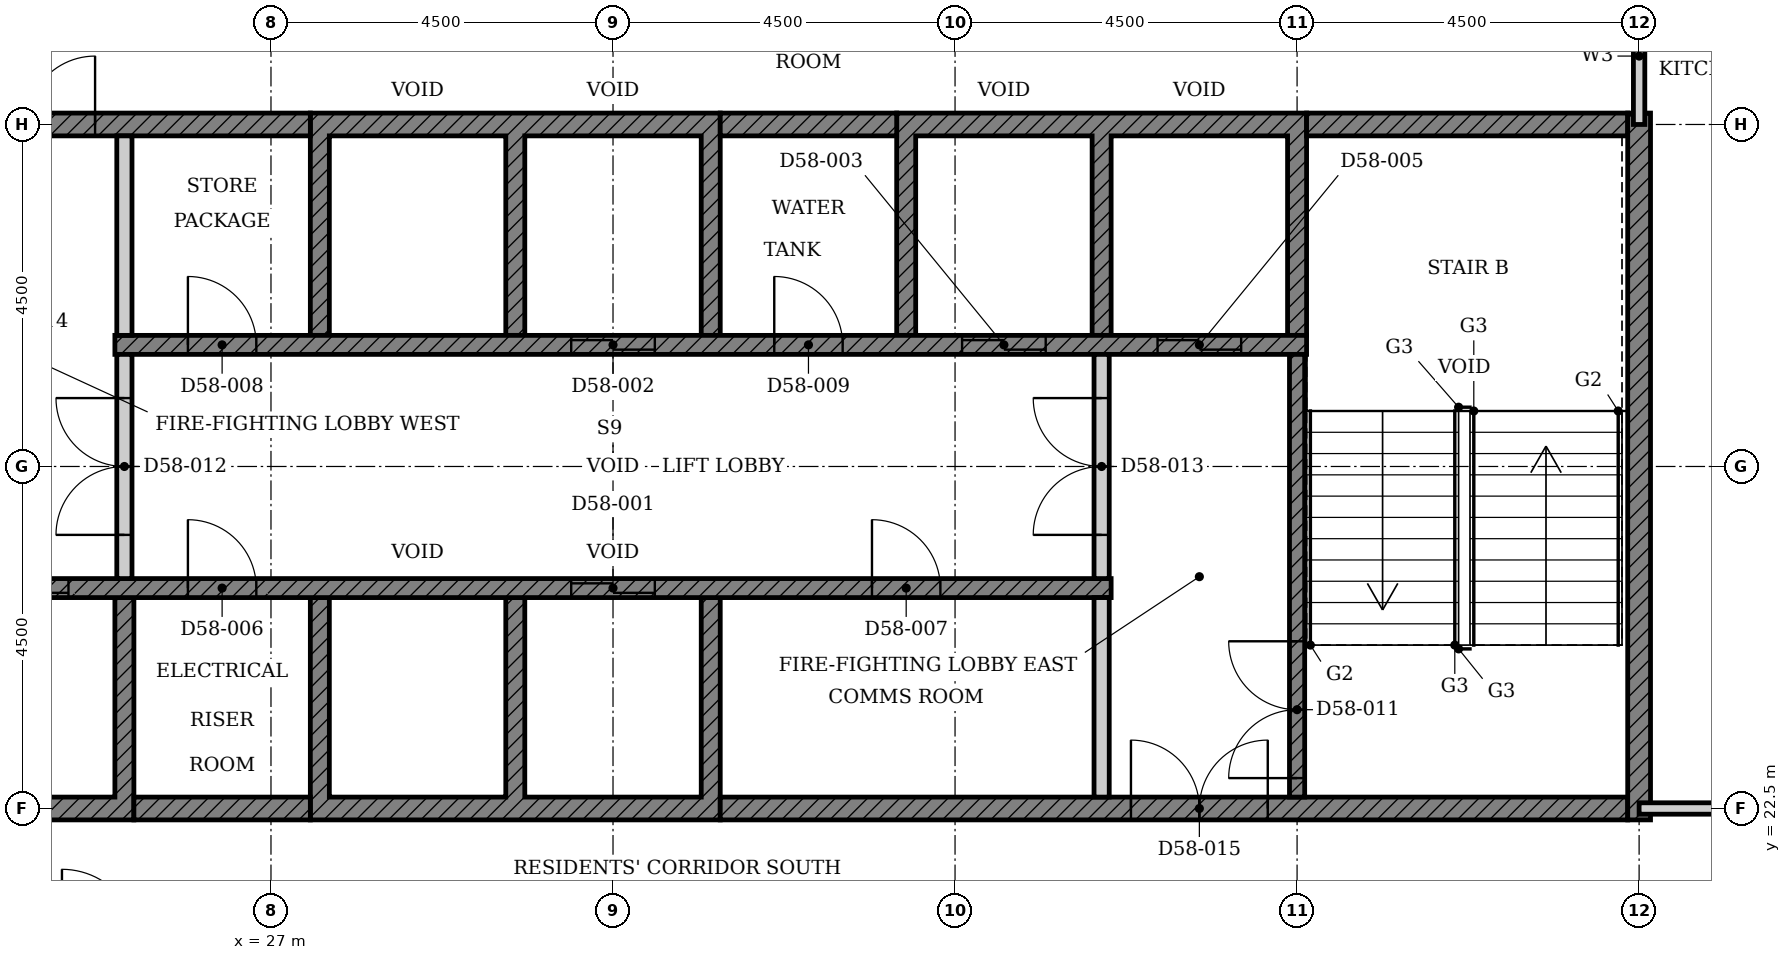
"""IFC4 building model, lengths in metres.
Left out: names, types, materials, properties, quantities, classifications, styles, units other than length and angle.
Written with IfcOpenShell. Run it as: python <this file> out.ifc"""

import sys

from ifc_helpers import new_model, si_unit, direction, frame, frame_2d, origin, place, context, subcontext, project, spatial, polyline, rectangle, outline, extrude, element, fill, save


model = new_model("IFC4")
c1 = context("Model", 3, precision=1e-05, world=origin(), true_north=direction((0.0, 1.0)))
c2 = subcontext(c1, "Body", "Model", "MODEL_VIEW")
j1 = project(units=[si_unit("LENGTHUNIT", "METRE"), si_unit("PLANEANGLEUNIT", "RADIAN")], contexts=[c1])
p1 = place(None, origin())
s1 = spatial("IfcSite", under=j1, at=p1, CompositionType="ELEMENT")
p2 = place(p1, origin())
s2 = spatial("IfcBuilding", under=s1, at=p2, CompositionType="ELEMENT")
p3 = place(p2, frame((0.0, 0.0, 229.4)))
s3 = spatial("IfcBuildingStorey", under=s2, at=p3, CompositionType="ELEMENT", Elevation=229.4)
p4 = place(p3, origin())
e1 = element("IfcWall", 1, at=p4, inside=s3, PredefinedType="SHEAR", context=c2, shape_type="SweptSolid", body=[
    extrude(outline(polyline([(22.375, 22.35), (25.197, 22.35), (25.197, 25.275), (24.947, 25.275), (24.947, 22.65), (22.625, 22.65), (22.625, 25.275), (22.375, 25.275), (22.375, 22.35)])), origin(), (0.0, 0.0, 1.0), 3.3),
])
p5 = place(p3, origin())
e2 = element("IfcWall", 2, at=p5, inside=s3, PredefinedType="SHEAR", context=c2, shape_type="SweptSolid", body=[
    extrude(outline(polyline([(27.518, 22.35), (32.911, 22.35), (32.911, 25.275), (32.661, 25.275), (32.661, 22.65), (30.339, 22.65), (30.339, 25.275), (30.089, 25.275), (30.089, 22.65), (27.768, 22.65), (27.768, 25.275), (27.518, 25.275), (27.518, 22.35)])), origin(), (0.0, 0.0, 1.0), 3.3),
])
p6 = place(p3, origin())
e3 = element("IfcWall", 3, at=p6, inside=s3, PredefinedType="SHEAR", context=c2, shape_type="SweptSolid", body=[
    extrude(outline(polyline([(27.518, 28.725), (27.768, 28.725), (27.768, 31.35), (30.089, 31.35), (30.089, 28.725), (30.339, 28.725), (30.339, 31.35), (32.661, 31.35), (32.661, 28.725), (32.911, 28.725), (32.911, 31.65), (27.518, 31.65), (27.518, 28.725)])), origin(), (0.0, 0.0, 1.0), 3.3),
])
p7 = place(p3, origin())
e4 = element("IfcWall", 4, at=p7, inside=s3, PredefinedType="SHEAR", context=c2, shape_type="SweptSolid", body=[
    extrude(outline(polyline([(35.232, 28.725), (35.482, 28.725), (35.482, 31.35), (37.803, 31.35), (37.803, 28.725), (38.053, 28.725), (38.053, 31.35), (40.375, 31.35), (40.375, 28.725), (40.625, 28.725), (40.625, 31.65), (35.232, 31.65), (35.232, 28.725)])), origin(), (0.0, 0.0, 1.0), 3.3),
])
p8 = place(p3, frame((25.197, 22.5, 0.0), z_axis=(0.0, 0.0, 1.0), x_axis=(1.0, 0.0, 0.0)))
e5 = element("IfcWall", 5, at=p8, inside=s3, PredefinedType="SHEAR", context=c2, shape_type="SweptSolid", body=[
    extrude(rectangle(XDim=2.321, YDim=0.3, at=frame_2d((1.161, 0.0))), origin(), (0.0, 0.0, 1.0), 3.3),
])
p9 = place(p3, frame((32.911, 22.5, 0.0), z_axis=(0.0, 0.0, 1.0), x_axis=(1.0, 0.0, 0.0)))
e6 = element("IfcWall", 6, at=p9, inside=s3, PredefinedType="SHEAR", context=c2, shape_type="SweptSolid", body=[
    extrude(rectangle(XDim=11.939, YDim=0.3, at=frame_2d((5.97, 0.0))), origin(), (0.0, 0.0, 1.0), 3.3),
])
p10 = place(p9, frame((5.404, 0.0, 0.0)))
e7 = element("IfcOpeningElement", 7, at=p10, cuts=e6, PredefinedType="OPENING", context=c2, shape_type="SweptSolid", body=[
    extrude(rectangle(XDim=1.8, YDim=2.1, at=frame_2d((0.9, 1.05))), frame((0.0, 0.16, 0.0), z_axis=(0.0, -1.0, 0.0), x_axis=(1.0, 0.0, 0.0)), (0.0, 0.0, 1.0), 0.32),
])
p11 = place(p3, frame((18.15, 31.5, 0.0), z_axis=(0.0, 0.0, 1.0), x_axis=(1.0, 0.0, 0.0)))
e8 = element("IfcWall", 8, at=p11, inside=s3, PredefinedType="SHEAR", context=c2, shape_type="SweptSolid", body=[
    extrude(rectangle(XDim=9.368, YDim=0.3, at=frame_2d((4.684, 0.0))), origin(), (0.0, 0.0, 1.0), 3.3),
])
p12 = place(p11, frame((4.736, 0.0, 0.0)))
e9 = element("IfcOpeningElement", 9, at=p12, cuts=e8, PredefinedType="OPENING", context=c2, shape_type="SweptSolid", body=[
    extrude(rectangle(XDim=1.8, YDim=2.1, at=frame_2d((0.9, 1.05))), frame((0.0, 0.16, 0.0), z_axis=(0.0, -1.0, 0.0), x_axis=(1.0, 0.0, 0.0)), (0.0, 0.0, 1.0), 0.32),
])
p13 = place(p3, frame((32.911, 31.5, 0.0), z_axis=(0.0, 0.0, 1.0), x_axis=(1.0, 0.0, 0.0)))
e10 = element("IfcWall", 10, at=p13, inside=s3, PredefinedType="SHEAR", context=c2, shape_type="SweptSolid", body=[
    extrude(rectangle(XDim=2.322, YDim=0.3, at=frame_2d((1.161, 0.0))), origin(), (0.0, 0.0, 1.0), 3.3),
])
p14 = place(p3, frame((40.625, 31.5, 0.0), z_axis=(0.0, 0.0, 1.0), x_axis=(1.0, 0.0, 0.0)))
e11 = element("IfcWall", 11, at=p14, inside=s3, PredefinedType="SHEAR", context=c2, shape_type="SweptSolid", body=[
    extrude(rectangle(XDim=4.225, YDim=0.3, at=frame_2d((2.113, 0.0))), origin(), (0.0, 0.0, 1.0), 3.3),
])
p15 = place(p3, frame((45.0, 22.35, 0.0), z_axis=(0.0, 0.0, 1.0), x_axis=(0.0, 1.0, 0.0)))
e12 = element("IfcWall", 12, at=p15, inside=s3, PredefinedType="SHEAR", context=c2, shape_type="SweptSolid", body=[
    extrude(rectangle(XDim=9.3, YDim=0.3, at=frame_2d((4.65, 0.0))), origin(), (0.0, 0.0, 1.0), 3.3),
])
p16 = place(p3, frame((22.375, 25.4, 0.0), z_axis=(0.0, 0.0, 1.0), x_axis=(1.0, 0.0, 0.0)))
e13 = element("IfcWall", 13, at=p16, inside=s3, PredefinedType="SHEAR", context=c2, shape_type="SweptSolid", body=[
    extrude(rectangle(XDim=15.678, YDim=0.25, at=frame_2d((7.839, 0.0))), origin(), (0.0, 0.0, 1.0), 3.3),
])
p17 = place(p16, frame((8.575, 0.0, 0.0)))
e14 = element("IfcOpeningElement", 14, at=p17, cuts=e13, PredefinedType="OPENING", context=c2, shape_type="SweptSolid", body=[
    extrude(rectangle(XDim=1.1, YDim=2.1, at=frame_2d((0.55, 1.05))), frame((0.0, 0.135, 0.0), z_axis=(0.0, -1.0, 0.0), x_axis=(1.0, 0.0, 0.0)), (0.0, 0.0, 1.0), 0.27),
])
p18 = place(p16, frame((0.861, 0.0, 0.0)))
e15 = element("IfcOpeningElement", 15, at=p18, cuts=e13, PredefinedType="OPENING", context=c2, shape_type="SweptSolid", body=[
    extrude(rectangle(XDim=1.1, YDim=2.1, at=frame_2d((0.55, 1.05))), frame((0.0, 0.135, 0.0), z_axis=(0.0, -1.0, 0.0), x_axis=(1.0, 0.0, 0.0)), (0.0, 0.0, 1.0), 0.27),
])
p19 = place(p16, frame((3.532, 0.0, 0.0)))
e16 = element("IfcOpeningElement", 16, at=p19, cuts=e13, PredefinedType="OPENING", context=c2, shape_type="SweptSolid", body=[
    extrude(rectangle(XDim=0.9, YDim=2.1, at=frame_2d((0.45, 1.05))), frame((0.0, 0.135, 0.0), z_axis=(0.0, -1.0, 0.0), x_axis=(1.0, 0.0, 0.0)), (0.0, 0.0, 1.0), 0.27),
])
p20 = place(p16, frame((12.532, 0.0, 0.0)))
e17 = element("IfcOpeningElement", 17, at=p20, cuts=e13, PredefinedType="OPENING", context=c2, shape_type="SweptSolid", body=[
    extrude(rectangle(XDim=0.9, YDim=2.1, at=frame_2d((0.45, 1.05))), frame((0.0, 0.135, 0.0), z_axis=(0.0, -1.0, 0.0), x_axis=(1.0, 0.0, 0.0)), (0.0, 0.0, 1.0), 0.27),
])
p21 = place(p3, frame((24.947, 28.6, 0.0), z_axis=(0.0, 0.0, 1.0), x_axis=(1.0, 0.0, 0.0)))
e18 = element("IfcWall", 18, at=p21, inside=s3, PredefinedType="SHEAR", context=c2, shape_type="SweptSolid", body=[
    extrude(rectangle(XDim=15.678, YDim=0.25, at=frame_2d((7.839, 0.0))), origin(), (0.0, 0.0, 1.0), 3.3),
])
p22 = place(p21, frame((6.004, 0.0, 0.0)))
e19 = element("IfcOpeningElement", 19, at=p22, cuts=e18, PredefinedType="OPENING", context=c2, shape_type="SweptSolid", body=[
    extrude(rectangle(XDim=1.1, YDim=2.1, at=frame_2d((0.55, 1.05))), frame((0.0, 0.135, 0.0), z_axis=(0.0, -1.0, 0.0), x_axis=(1.0, 0.0, 0.0)), (0.0, 0.0, 1.0), 0.27),
])
p23 = place(p21, frame((11.146, 0.0, 0.0)))
e20 = element("IfcOpeningElement", 20, at=p23, cuts=e18, PredefinedType="OPENING", context=c2, shape_type="SweptSolid", body=[
    extrude(rectangle(XDim=1.1, YDim=2.1, at=frame_2d((0.55, 1.05))), frame((0.0, 0.135, 0.0), z_axis=(0.0, -1.0, 0.0), x_axis=(1.0, 0.0, 0.0)), (0.0, 0.0, 1.0), 0.27),
])
p24 = place(p21, frame((13.718, 0.0, 0.0)))
e21 = element("IfcOpeningElement", 21, at=p24, cuts=e18, PredefinedType="OPENING", context=c2, shape_type="SweptSolid", body=[
    extrude(rectangle(XDim=1.1, YDim=2.1, at=frame_2d((0.55, 1.05))), frame((0.0, 0.135, 0.0), z_axis=(0.0, -1.0, 0.0), x_axis=(1.0, 0.0, 0.0)), (0.0, 0.0, 1.0), 0.27),
])
p25 = place(p21, frame((0.961, 0.0, 0.0)))
e22 = element("IfcOpeningElement", 22, at=p25, cuts=e18, PredefinedType="OPENING", context=c2, shape_type="SweptSolid", body=[
    extrude(rectangle(XDim=0.9, YDim=2.1, at=frame_2d((0.45, 1.05))), frame((0.0, 0.135, 0.0), z_axis=(0.0, -1.0, 0.0), x_axis=(1.0, 0.0, 0.0)), (0.0, 0.0, 1.0), 0.27),
])
p26 = place(p21, frame((8.675, 0.0, 0.0)))
e23 = element("IfcOpeningElement", 23, at=p26, cuts=e18, PredefinedType="OPENING", context=c2, shape_type="SweptSolid", body=[
    extrude(rectangle(XDim=0.9, YDim=2.1, at=frame_2d((0.45, 1.05))), frame((0.0, 0.135, 0.0), z_axis=(0.0, -1.0, 0.0), x_axis=(1.0, 0.0, 0.0)), (0.0, 0.0, 1.0), 0.27),
])
for number, where, z_axis, x_axis in (
    (24, (37.928, 22.65, 0.0), (0.0, 0.0, 1.0), (0.0, 1.0, 0.0)),
    (25, (25.072, 28.725, 0.0), (0.0, 0.0, 1.0), (0.0, 1.0, 0.0)),
):
    element("IfcWall", number, at=place(p3, frame(where, z_axis=z_axis, x_axis=x_axis)), inside=s3, PredefinedType="PARTITIONING", context=c2, shape_type="SweptSolid", body=[
        extrude(rectangle(XDim=2.625, YDim=0.2, at=frame_2d((1.312, 0.0))), origin(), (0.0, 0.0, 1.0), 3.3),
    ])
p27 = place(p3, frame((40.5, 22.65, 0.0), z_axis=(0.0, 0.0, 1.0), x_axis=(0.0, 1.0, 0.0)))
e26 = element("IfcWall", 26, at=p27, inside=s3, PredefinedType="SHEAR", context=c2, shape_type="SweptSolid", body=[
    extrude(rectangle(XDim=5.825, YDim=0.2, at=frame_2d((2.913, 0.0))), origin(), (0.0, 0.0, 1.0), 3.3),
])
p28 = place(p27, frame((0.25, 0.0, 0.0)))
e27 = element("IfcOpeningElement", 27, at=p28, cuts=e26, PredefinedType="OPENING", context=c2, shape_type="SweptSolid", body=[
    extrude(rectangle(XDim=1.8, YDim=2.1, at=frame_2d((0.9, 1.05))), frame((0.0, 0.11, 0.0), z_axis=(0.0, -1.0, 0.0), x_axis=(1.0, 0.0, 0.0)), (0.0, 0.0, 1.0), 0.22),
])
p29 = place(p3, frame((25.072, 25.525, 0.0), z_axis=(0.0, 0.0, 1.0), x_axis=(0.0, 1.0, 0.0)))
e28 = element("IfcWall", 28, at=p29, inside=s3, PredefinedType="PARTITIONING", context=c2, shape_type="SweptSolid", body=[
    extrude(rectangle(XDim=2.95, YDim=0.2, at=frame_2d((1.475, 0.0))), origin(), (0.0, 0.0, 1.0), 3.3),
])
p30 = place(p29, frame((0.575, 0.0, 0.0)))
e29 = element("IfcOpeningElement", 29, at=p30, cuts=e28, PredefinedType="OPENING", context=c2, shape_type="SweptSolid", body=[
    extrude(rectangle(XDim=1.8, YDim=2.1, at=frame_2d((0.9, 1.05))), frame((0.0, 0.11, 0.0), z_axis=(0.0, -1.0, 0.0), x_axis=(1.0, 0.0, 0.0)), (0.0, 0.0, 1.0), 0.22),
])
p31 = place(p3, frame((37.928, 25.525, 0.0), z_axis=(0.0, 0.0, 1.0), x_axis=(0.0, 1.0, 0.0)))
e30 = element("IfcWall", 30, at=p31, inside=s3, PredefinedType="PARTITIONING", context=c2, shape_type="SweptSolid", body=[
    extrude(rectangle(XDim=2.95, YDim=0.2, at=frame_2d((1.475, 0.0))), origin(), (0.0, 0.0, 1.0), 3.3),
])
p32 = place(p31, frame((0.575, 0.0, 0.0)))
e31 = element("IfcOpeningElement", 31, at=p32, cuts=e30, PredefinedType="OPENING", context=c2, shape_type="SweptSolid", body=[
    extrude(rectangle(XDim=1.8, YDim=2.1, at=frame_2d((0.9, 1.05))), frame((0.0, 0.11, 0.0), z_axis=(0.0, -1.0, 0.0), x_axis=(1.0, 0.0, 0.0)), (0.0, 0.0, 1.0), 0.22),
])
p33 = place(p3, frame((45.0, 22.5, 0.0), z_axis=(0.0, 0.0, 1.0), x_axis=(1.0, 0.0, 0.0)))
e32 = element("IfcWall", 32, at=p33, inside=s3, PredefinedType="PARTITIONING", context=c2, shape_type="SweptSolid", body=[
    extrude(rectangle(XDim=4.765, YDim=0.15, at=frame_2d((2.382, 0.0))), origin(), (0.0, 0.0, 1.0), 3.3),
])
p34 = place(p33, frame((1.75, 0.0, 0.0)))
e33 = element("IfcOpeningElement", 33, at=p34, cuts=e32, PredefinedType="OPENING", context=c2, shape_type="SweptSolid", body=[
    extrude(rectangle(XDim=1.0, YDim=2.2, at=frame_2d((0.5, 1.1))), frame((0.0, 0.085, 0.0), z_axis=(0.0, -1.0, 0.0), x_axis=(1.0, 0.0, 0.0)), (0.0, 0.0, 1.0), 0.17),
])
p35 = place(p3, frame((45.0, 31.5, 0.0), z_axis=(0.0, 0.0, 1.0), x_axis=(0.0, 1.0, 0.0)))
e34 = element("IfcWall", 34, at=p35, inside=s3, PredefinedType="PARTITIONING", context=c2, shape_type="SweptSolid", body=[
    extrude(rectangle(XDim=1.8, YDim=0.15, at=frame_2d((0.9, 0.0))), origin(), (0.0, 0.0, 1.0), 3.3),
])
p36 = place(p17, origin())
e35 = element("IfcDoor", 35, at=p36, inside=s3, OperationType="DOUBLE_DOOR_SLIDING", PredefinedType="DOOR", context=c2, shape_type="SweptSolid", body=[
    extrude(rectangle(XDim=1.1, YDim=2.1, at=frame_2d((0.55, 1.05))), frame((0.0, 0.025, 0.0), z_axis=(0.0, -1.0, 0.0), x_axis=(1.0, 0.0, 0.0)), (0.0, 0.0, 1.0), 0.05),
])
fill(e14, e35)
p37 = place(p22, origin())
e36 = element("IfcDoor", 36, at=p37, inside=s3, OperationType="DOUBLE_DOOR_SLIDING", PredefinedType="DOOR", context=c2, shape_type="SweptSolid", body=[
    extrude(rectangle(XDim=1.1, YDim=2.1, at=frame_2d((0.55, 1.05))), frame((0.0, 0.025, 0.0), z_axis=(0.0, -1.0, 0.0), x_axis=(1.0, 0.0, 0.0)), (0.0, 0.0, 1.0), 0.05),
])
fill(e19, e36)
p38 = place(p23, origin())
e37 = element("IfcDoor", 37, at=p38, inside=s3, OperationType="DOUBLE_DOOR_SLIDING", PredefinedType="DOOR", context=c2, shape_type="SweptSolid", body=[
    extrude(rectangle(XDim=1.1, YDim=2.1, at=frame_2d((0.55, 1.05))), frame((0.0, 0.025, 0.0), z_axis=(0.0, -1.0, 0.0), x_axis=(1.0, 0.0, 0.0)), (0.0, 0.0, 1.0), 0.05),
])
fill(e20, e37)
p39 = place(p18, origin())
e38 = element("IfcDoor", 38, at=p39, inside=s3, OperationType="DOUBLE_DOOR_SLIDING", PredefinedType="DOOR", context=c2, shape_type="SweptSolid", body=[
    extrude(rectangle(XDim=1.1, YDim=2.1, at=frame_2d((0.55, 1.05))), frame((0.0, 0.025, 0.0), z_axis=(0.0, -1.0, 0.0), x_axis=(1.0, 0.0, 0.0)), (0.0, 0.0, 1.0), 0.05),
])
fill(e15, e38)
p40 = place(p24, origin())
e39 = element("IfcDoor", 39, at=p40, inside=s3, OperationType="DOUBLE_DOOR_SLIDING", PredefinedType="DOOR", context=c2, shape_type="SweptSolid", body=[
    extrude(rectangle(XDim=1.1, YDim=2.1, at=frame_2d((0.55, 1.05))), frame((0.0, 0.025, 0.0), z_axis=(0.0, -1.0, 0.0), x_axis=(1.0, 0.0, 0.0)), (0.0, 0.0, 1.0), 0.05),
])
fill(e21, e39)
p41 = place(p19, origin())
e40 = element("IfcDoor", 40, at=p41, inside=s3, OperationType="SINGLE_SWING_LEFT", PredefinedType="DOOR", context=c2, shape_type="SweptSolid", body=[
    extrude(rectangle(XDim=0.9, YDim=2.1, at=frame_2d((0.45, 1.05))), frame((0.0, 0.025, 0.0), z_axis=(0.0, -1.0, 0.0), x_axis=(1.0, 0.0, 0.0)), (0.0, 0.0, 1.0), 0.05),
])
fill(e16, e40)
p42 = place(p20, origin())
e41 = element("IfcDoor", 41, at=p42, inside=s3, OperationType="SINGLE_SWING_LEFT", PredefinedType="DOOR", context=c2, shape_type="SweptSolid", body=[
    extrude(rectangle(XDim=0.9, YDim=2.1, at=frame_2d((0.45, 1.05))), frame((0.0, 0.025, 0.0), z_axis=(0.0, -1.0, 0.0), x_axis=(1.0, 0.0, 0.0)), (0.0, 0.0, 1.0), 0.05),
])
fill(e17, e41)
p43 = place(p25, origin())
e42 = element("IfcDoor", 42, at=p43, inside=s3, OperationType="SINGLE_SWING_LEFT", PredefinedType="DOOR", context=c2, shape_type="SweptSolid", body=[
    extrude(rectangle(XDim=0.9, YDim=2.1, at=frame_2d((0.45, 1.05))), frame((0.0, 0.025, 0.0), z_axis=(0.0, -1.0, 0.0), x_axis=(1.0, 0.0, 0.0)), (0.0, 0.0, 1.0), 0.05),
])
fill(e22, e42)
p44 = place(p26, origin())
e43 = element("IfcDoor", 43, at=p44, inside=s3, OperationType="SINGLE_SWING_LEFT", PredefinedType="DOOR", context=c2, shape_type="SweptSolid", body=[
    extrude(rectangle(XDim=0.9, YDim=2.1, at=frame_2d((0.45, 1.05))), frame((0.0, 0.025, 0.0), z_axis=(0.0, -1.0, 0.0), x_axis=(1.0, 0.0, 0.0)), (0.0, 0.0, 1.0), 0.05),
])
fill(e23, e43)
p45 = place(p28, origin())
e44 = element("IfcDoor", 44, at=p45, inside=s3, OperationType="DOUBLE_DOOR_SINGLE_SWING", PredefinedType="DOOR", context=c2, shape_type="SweptSolid", body=[
    extrude(rectangle(XDim=1.8, YDim=2.1, at=frame_2d((0.9, 1.05))), frame((0.0, 0.025, 0.0), z_axis=(0.0, -1.0, 0.0), x_axis=(1.0, 0.0, 0.0)), (0.0, 0.0, 1.0), 0.05),
])
fill(e27, e44)
p46 = place(p30, origin())
e45 = element("IfcDoor", 45, at=p46, inside=s3, OperationType="DOUBLE_DOOR_SINGLE_SWING", PredefinedType="DOOR", context=c2, shape_type="SweptSolid", body=[
    extrude(rectangle(XDim=1.8, YDim=2.1, at=frame_2d((0.9, 1.05))), frame((0.0, 0.025, 0.0), z_axis=(0.0, -1.0, 0.0), x_axis=(1.0, 0.0, 0.0)), (0.0, 0.0, 1.0), 0.05),
])
fill(e29, e45)
p47 = place(p32, origin())
e46 = element("IfcDoor", 46, at=p47, inside=s3, OperationType="DOUBLE_DOOR_SINGLE_SWING", PredefinedType="DOOR", context=c2, shape_type="SweptSolid", body=[
    extrude(rectangle(XDim=1.8, YDim=2.1, at=frame_2d((0.9, 1.05))), frame((0.0, 0.025, 0.0), z_axis=(0.0, -1.0, 0.0), x_axis=(1.0, 0.0, 0.0)), (0.0, 0.0, 1.0), 0.05),
])
fill(e31, e46)
p48 = place(p12, origin())
e47 = element("IfcDoor", 47, at=p48, inside=s3, OperationType="DOUBLE_DOOR_SINGLE_SWING", PredefinedType="DOOR", context=c2, shape_type="SweptSolid", body=[
    extrude(rectangle(XDim=1.8, YDim=2.1, at=frame_2d((0.9, 1.05))), frame((0.0, 0.025, 0.0), z_axis=(0.0, -1.0, 0.0), x_axis=(1.0, 0.0, 0.0)), (0.0, 0.0, 1.0), 0.05),
])
fill(e9, e47)
p49 = place(p10, origin())
e48 = element("IfcDoor", 48, at=p49, inside=s3, OperationType="DOUBLE_DOOR_SINGLE_SWING", PredefinedType="DOOR", context=c2, shape_type="SweptSolid", body=[
    extrude(rectangle(XDim=1.8, YDim=2.1, at=frame_2d((0.9, 1.05))), frame((0.0, 0.025, 0.0), z_axis=(0.0, -1.0, 0.0), x_axis=(1.0, 0.0, 0.0)), (0.0, 0.0, 1.0), 0.05),
])
fill(e7, e48)
save(model, sys.argv[1])
